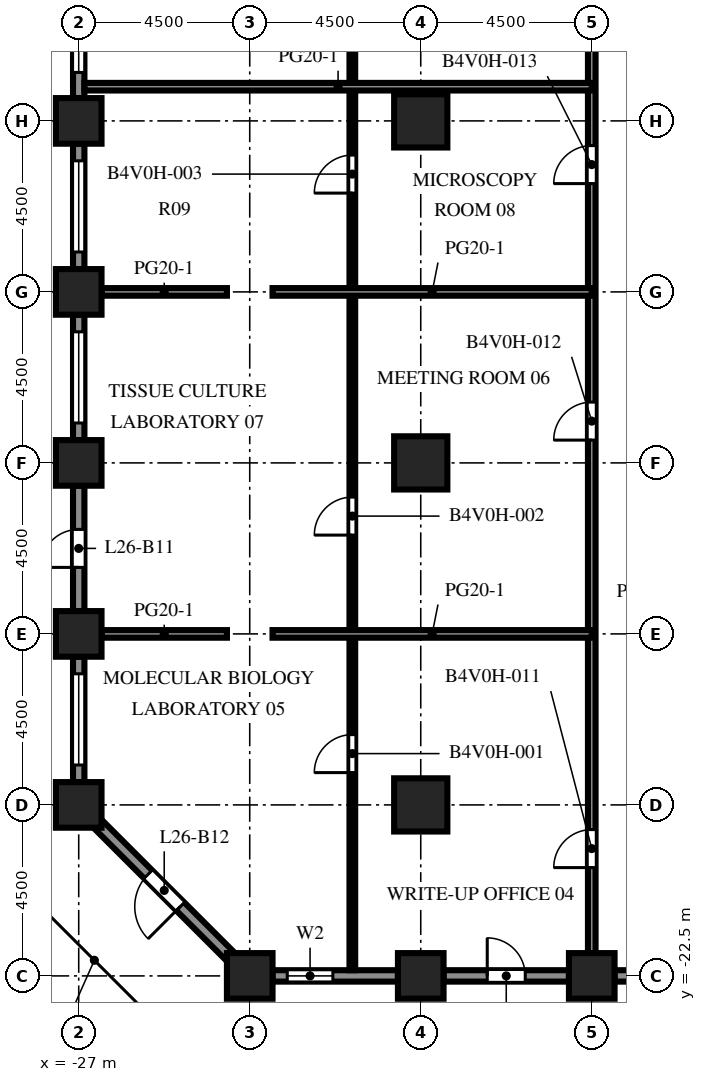
"""IFC4 building model, lengths in metres.
Left out: names, types, materials, properties, quantities, classifications, styles, units other than length and angle.
Written with IfcOpenShell. Run it as: python <this file> out.ifc"""

import sys

from ifc_helpers import new_model, si_unit, direction, frame, frame_2d, origin, origin_2d, place, context, subcontext, project, spatial, rectangle, extrude, element, fill, save


model = new_model("IFC4")
c1 = context("Model", 3, precision=1e-05, world=origin(), true_north=direction((0.0, 1.0)))
c2 = subcontext(c1, "Body", "Model", "MODEL_VIEW")
j1 = project(units=[si_unit("LENGTHUNIT", "METRE"), si_unit("PLANEANGLEUNIT", "RADIAN")], contexts=[c1])
p1 = place(None, origin())
s1 = spatial("IfcSite", under=j1, at=p1, CompositionType="ELEMENT")
p2 = place(p1, origin())
s2 = spatial("IfcBuilding", under=s1, at=p2, CompositionType="ELEMENT")
p3 = place(p2, frame((0.0, 0.0, 116.7)))
s3 = spatial("IfcBuildingStorey", under=s2, at=p3, CompositionType="ELEMENT", Elevation=116.7)
for number, where, z_axis, x_axis in (
    (1, (-27.0, -18.0, -0.45), (0.0, 0.0, 1.0), (1.0, 0.0, 0.0)),
    (2, (-27.0, -13.5, -0.45), (0.0, 0.0, 1.0), (1.0, 0.0, 0.0)),
    (3, (-27.0, -9.0, -0.45), (0.0, 0.0, 1.0), (1.0, 0.0, 0.0)),
    (4, (-27.0, -4.5, -0.45), (0.0, 0.0, 1.0), (1.0, 0.0, 0.0)),
    (5, (-27.0, 0.0, -0.45), (0.0, 0.0, 1.0), (1.0, 0.0, 0.0)),
):
    element("IfcColumn", number, at=place(p3, frame(where, z_axis=z_axis, x_axis=x_axis)), inside=s3, PredefinedType="COLUMN", context=c2, shape_type="SweptSolid", body=[
        extrude(rectangle(XDim=1.2, YDim=1.2, at=origin_2d()), origin(), (0.0, 0.0, 1.0), 4.55),
    ])
for number, where, z_axis, x_axis in (
    (6, (-22.5, -22.5, 0.0), (0.0, 0.0, 1.0), (1.0, 0.0, 0.0)),
    (7, (-18.0, -22.5, 0.0), (0.0, 0.0, 1.0), (1.0, 0.0, 0.0)),
    (8, (-13.5, -22.5, 0.0), (0.0, 0.0, 1.0), (1.0, 0.0, 0.0)),
):
    element("IfcColumn", number, at=place(p3, frame(where, z_axis=z_axis, x_axis=x_axis)), inside=s3, PredefinedType="COLUMN", context=c2, shape_type="SweptSolid", body=[
        extrude(rectangle(XDim=1.2, YDim=1.2, at=origin_2d()), origin(), (0.0, 0.0, 1.0), 4.1),
    ])
for number, where, z_axis, x_axis in (
    (9, (-18.0, -18.0, -0.45), (0.0, 0.0, 1.0), (1.0, 0.0, 0.0)),
    (10, (-18.0, -9.0, -0.45), (0.0, 0.0, 1.0), (1.0, 0.0, 0.0)),
    (11, (-18.0, 0.0, -0.45), (0.0, 0.0, 1.0), (1.0, 0.0, 0.0)),
):
    element("IfcColumn", number, at=place(p3, frame(where, z_axis=z_axis, x_axis=x_axis)), inside=s3, PredefinedType="COLUMN", context=c2, shape_type="SweptSolid", body=[
        extrude(rectangle(XDim=1.4, YDim=1.4, at=origin_2d()), origin(), (0.0, 0.0, 1.0), 4.55),
    ])
p4 = place(p3, frame((-18.6, -22.5, 0.0), z_axis=(0.0, 0.0, 1.0), x_axis=(-1.0, 0.0, 0.0)))
e12 = element("IfcWall", 12, at=p4, inside=s3, PredefinedType="SOLIDWALL", context=c2, shape_type="SweptSolid", body=[
    extrude(rectangle(XDim=3.3, YDim=0.3, at=frame_2d((1.65, 0.0))), origin(), (0.0, 0.0, 1.0), 2.75),
])
p5 = place(p4, frame((1.712, 0.0, 0.8)))
e13 = element("IfcOpeningElement", 13, at=p5, cuts=e12, PredefinedType="OPENING", context=c2, shape_type="SweptSolid", body=[
    extrude(rectangle(XDim=1.2, YDim=1.7, at=frame_2d((0.6, 0.85))), frame((0.0, 0.16, 0.0), z_axis=(0.0, -1.0, 0.0), x_axis=(1.0, 0.0, 0.0)), (0.0, 0.0, 1.0), 0.32),
])
p6 = place(p3, frame((-14.1, -22.5, 0.0), z_axis=(0.0, 0.0, 1.0), x_axis=(-1.0, 0.0, 0.0)))
e14 = element("IfcWall", 14, at=p6, inside=s3, PredefinedType="SOLIDWALL", context=c2, shape_type="SweptSolid", body=[
    extrude(rectangle(XDim=3.3, YDim=0.3, at=frame_2d((1.65, 0.0))), origin(), (0.0, 0.0, 1.0), 2.75),
])
p7 = place(p6, frame((1.15, 0.0, 0.0)))
e15 = element("IfcOpeningElement", 15, at=p7, cuts=e14, PredefinedType="OPENING", context=c2, shape_type="SweptSolid", body=[
    extrude(rectangle(XDim=1.0, YDim=2.2, at=frame_2d((0.5, 1.1))), frame((0.0, 0.16, 0.0), z_axis=(0.0, -1.0, 0.0), x_axis=(1.0, 0.0, 0.0)), (0.0, 0.0, 1.0), 0.32),
])
p8 = place(p3, frame((-9.6, -22.5, 0.0), z_axis=(0.0, 0.0, 1.0), x_axis=(-1.0, 0.0, 0.0)))
e16 = element("IfcWall", 16, at=p8, inside=s3, PredefinedType="SOLIDWALL", context=c2, shape_type="SweptSolid", body=[
    extrude(rectangle(XDim=3.3, YDim=0.3, at=frame_2d((1.65, 0.0))), origin(), (0.0, 0.0, 1.0), 2.75),
])
p9 = place(p8, frame((1.575, 0.0, 0.8)))
e17 = element("IfcOpeningElement", 17, at=p9, cuts=e16, PredefinedType="OPENING", context=c2, shape_type="SweptSolid", body=[
    extrude(rectangle(XDim=1.2, YDim=1.7, at=frame_2d((0.6, 0.85))), frame((0.0, 0.16, 0.0), z_axis=(0.0, -1.0, 0.0), x_axis=(1.0, 0.0, 0.0)), (0.0, 0.0, 1.0), 0.32),
])
p10 = place(p3, frame((-27.0, 0.6, 0.0), z_axis=(0.0, 0.0, 1.0), x_axis=(0.0, 1.0, 0.0)))
e18 = element("IfcWall", 18, at=p10, inside=s3, PredefinedType="SOLIDWALL", context=c2, shape_type="SweptSolid", body=[
    extrude(rectangle(XDim=3.3, YDim=0.3, at=frame_2d((1.65, 0.0))), origin(), (0.0, 0.0, 1.0), 2.75),
])
p11 = place(p10, frame((0.675, 0.0, 0.8)))
e19 = element("IfcOpeningElement", 19, at=p11, cuts=e18, PredefinedType="OPENING", context=c2, shape_type="SweptSolid", body=[
    extrude(rectangle(XDim=2.4, YDim=1.7, at=frame_2d((1.2, 0.85))), frame((0.0, 0.16, 0.0), z_axis=(0.0, -1.0, 0.0), x_axis=(1.0, 0.0, 0.0)), (0.0, 0.0, 1.0), 0.32),
])
p12 = place(p3, frame((-27.0, -3.9, 0.0), z_axis=(0.0, 0.0, 1.0), x_axis=(0.0, 1.0, 0.0)))
e20 = element("IfcWall", 20, at=p12, inside=s3, PredefinedType="SOLIDWALL", context=c2, shape_type="SweptSolid", body=[
    extrude(rectangle(XDim=3.3, YDim=0.3, at=frame_2d((1.65, 0.0))), origin(), (0.0, 0.0, 1.0), 2.75),
])
p13 = place(p12, frame((0.45, 0.0, 0.8)))
e21 = element("IfcOpeningElement", 21, at=p13, cuts=e20, PredefinedType="OPENING", context=c2, shape_type="SweptSolid", body=[
    extrude(rectangle(XDim=2.4, YDim=1.7, at=frame_2d((1.2, 0.85))), frame((0.0, 0.16, 0.0), z_axis=(0.0, -1.0, 0.0), x_axis=(1.0, 0.0, 0.0)), (0.0, 0.0, 1.0), 0.32),
])
p14 = place(p3, frame((-27.0, -8.4, 0.0), z_axis=(0.0, 0.0, 1.0), x_axis=(0.0, 1.0, 0.0)))
e22 = element("IfcWall", 22, at=p14, inside=s3, PredefinedType="SOLIDWALL", context=c2, shape_type="SweptSolid", body=[
    extrude(rectangle(XDim=3.3, YDim=0.3, at=frame_2d((1.65, 0.0))), origin(), (0.0, 0.0, 1.0), 2.75),
])
p15 = place(p14, frame((0.45, 0.0, 0.8)))
e23 = element("IfcOpeningElement", 23, at=p15, cuts=e22, PredefinedType="OPENING", context=c2, shape_type="SweptSolid", body=[
    extrude(rectangle(XDim=2.4, YDim=1.7, at=frame_2d((1.2, 0.85))), frame((0.0, 0.16, 0.0), z_axis=(0.0, -1.0, 0.0), x_axis=(1.0, 0.0, 0.0)), (0.0, 0.0, 1.0), 0.32),
])
p16 = place(p3, frame((-27.0, -12.9, 0.0), z_axis=(0.0, 0.0, 1.0), x_axis=(0.0, 1.0, 0.0)))
e24 = element("IfcWall", 24, at=p16, inside=s3, PredefinedType="SOLIDWALL", context=c2, shape_type="SweptSolid", body=[
    extrude(rectangle(XDim=3.3, YDim=0.3, at=frame_2d((1.65, 0.0))), origin(), (0.0, 0.0, 1.0), 2.75),
])
p17 = place(p16, frame((1.15, 0.0, 0.0)))
e25 = element("IfcOpeningElement", 25, at=p17, cuts=e24, PredefinedType="OPENING", context=c2, shape_type="SweptSolid", body=[
    extrude(rectangle(XDim=1.0, YDim=2.2, at=frame_2d((0.5, 1.1))), frame((0.0, 0.16, 0.0), z_axis=(0.0, -1.0, 0.0), x_axis=(1.0, 0.0, 0.0)), (0.0, 0.0, 1.0), 0.32),
])
p18 = place(p3, frame((-27.0, -17.4, 0.0), z_axis=(0.0, 0.0, 1.0), x_axis=(0.0, 1.0, 0.0)))
e26 = element("IfcWall", 26, at=p18, inside=s3, PredefinedType="SOLIDWALL", context=c2, shape_type="SweptSolid", body=[
    extrude(rectangle(XDim=3.3, YDim=0.3, at=frame_2d((1.65, 0.0))), origin(), (0.0, 0.0, 1.0), 2.75),
])
p19 = place(p18, frame((0.45, 0.0, 0.8)))
e27 = element("IfcOpeningElement", 27, at=p19, cuts=e26, PredefinedType="OPENING", context=c2, shape_type="SweptSolid", body=[
    extrude(rectangle(XDim=2.4, YDim=1.7, at=frame_2d((1.2, 0.85))), frame((0.0, 0.16, 0.0), z_axis=(0.0, -1.0, 0.0), x_axis=(1.0, 0.0, 0.0)), (0.0, 0.0, 1.0), 0.32),
])
p20 = place(p3, frame((-22.994, -22.006, 0.0), z_axis=(0.0, 0.0, 1.0), x_axis=(-0.707106781187, 0.707106781187, 0.0)))
e28 = element("IfcWall", 28, at=p20, inside=s3, PredefinedType="SOLIDWALL", context=c2, shape_type="SweptSolid", body=[
    extrude(rectangle(XDim=4.967, YDim=0.3, at=frame_2d((2.483, 0.0))), origin(), (0.0, 0.0, 1.0), 2.75),
])
p21 = place(p20, frame((1.884, 0.0, 0.0)))
e29 = element("IfcOpeningElement", 29, at=p21, cuts=e28, PredefinedType="OPENING", context=c2, shape_type="SweptSolid", body=[
    extrude(rectangle(XDim=1.2, YDim=2.2, at=frame_2d((0.6, 1.1))), frame((0.0, 0.16, 0.0), z_axis=(0.0, -1.0, 0.0), x_axis=(1.0, 0.0, 0.0)), (0.0, 0.0, 1.0), 0.32),
])
p22 = place(p3, frame((-19.8, -22.35, 0.0), z_axis=(0.0, 0.0, 1.0), x_axis=(0.0, 1.0, 0.0)))
e30 = element("IfcWall", 30, at=p22, inside=s3, PredefinedType="PARTITIONING", context=c2, shape_type="SweptSolid", body=[
    extrude(rectangle(XDim=53.7, YDim=0.15, at=frame_2d((26.85, 0.0))), origin(), (0.0, 0.0, 1.0), 3.65),
])
p23 = place(p22, frame((5.2, 0.0, 0.0)))
e31 = element("IfcOpeningElement", 31, at=p23, cuts=e30, PredefinedType="OPENING", context=c2, shape_type="SweptSolid", body=[
    extrude(rectangle(XDim=1.0, YDim=2.1, at=frame_2d((0.5, 1.05))), frame((0.0, 0.085, 0.0), z_axis=(0.0, -1.0, 0.0), x_axis=(1.0, 0.0, 0.0)), (0.0, 0.0, 1.0), 0.17),
])
p24 = place(p22, frame((11.45, 0.0, 0.0)))
e32 = element("IfcOpeningElement", 32, at=p24, cuts=e30, PredefinedType="OPENING", context=c2, shape_type="SweptSolid", body=[
    extrude(rectangle(XDim=1.0, YDim=2.1, at=frame_2d((0.5, 1.05))), frame((0.0, 0.085, 0.0), z_axis=(0.0, -1.0, 0.0), x_axis=(1.0, 0.0, 0.0)), (0.0, 0.0, 1.0), 0.17),
])
p25 = place(p22, frame((20.45, 0.0, 0.0)))
e33 = element("IfcOpeningElement", 33, at=p25, cuts=e30, PredefinedType="OPENING", context=c2, shape_type="SweptSolid", body=[
    extrude(rectangle(XDim=1.0, YDim=2.1, at=frame_2d((0.5, 1.05))), frame((0.0, 0.085, 0.0), z_axis=(0.0, -1.0, 0.0), x_axis=(1.0, 0.0, 0.0)), (0.0, 0.0, 1.0), 0.17),
])
p26 = place(p22, frame((27.85, 0.0, 0.0)))
e34 = element("IfcOpeningElement", 34, at=p26, cuts=e30, PredefinedType="OPENING", context=c2, shape_type="SweptSolid", body=[
    extrude(rectangle(XDim=1.0, YDim=2.1, at=frame_2d((0.5, 1.05))), frame((0.0, 0.085, 0.0), z_axis=(0.0, -1.0, 0.0), x_axis=(1.0, 0.0, 0.0)), (0.0, 0.0, 1.0), 0.17),
])
p27 = place(p22, frame((41.2, 0.0, 0.0)))
e35 = element("IfcOpeningElement", 35, at=p27, cuts=e30, PredefinedType="OPENING", context=c2, shape_type="SweptSolid", body=[
    extrude(rectangle(XDim=1.0, YDim=2.1, at=frame_2d((0.5, 1.05))), frame((0.0, 0.085, 0.0), z_axis=(0.0, -1.0, 0.0), x_axis=(1.0, 0.0, 0.0)), (0.0, 0.0, 1.0), 0.17),
])
p28 = place(p22, frame((50.2, 0.0, 0.0)))
e36 = element("IfcOpeningElement", 36, at=p28, cuts=e30, PredefinedType="OPENING", context=c2, shape_type="SweptSolid", body=[
    extrude(rectangle(XDim=1.0, YDim=2.1, at=frame_2d((0.5, 1.05))), frame((0.0, 0.085, 0.0), z_axis=(0.0, -1.0, 0.0), x_axis=(1.0, 0.0, 0.0)), (0.0, 0.0, 1.0), 0.17),
])
p29 = place(p3, frame((-13.5, -21.9, 0.0), z_axis=(0.0, 0.0, 1.0), x_axis=(0.0, 1.0, 0.0)))
e37 = element("IfcWall", 37, at=p29, inside=s3, PredefinedType="PARTITIONING", context=c2, shape_type="SweptSolid", body=[
    extrude(rectangle(XDim=52.8, YDim=0.2, at=frame_2d((26.4, 0.0))), origin(), (0.0, 0.0, 1.0), 3.65),
])
p30 = place(p29, frame((2.25, 0.0, 0.0)))
e38 = element("IfcOpeningElement", 38, at=p30, cuts=e37, PredefinedType="OPENING", context=c2, shape_type="SweptSolid", body=[
    extrude(rectangle(XDim=1.0, YDim=2.1, at=frame_2d((0.5, 1.05))), frame((0.0, 0.11, 0.0), z_axis=(0.0, -1.0, 0.0), x_axis=(1.0, 0.0, 0.0)), (0.0, 0.0, 1.0), 0.22),
])
p31 = place(p29, frame((13.5, 0.0, 0.0)))
e39 = element("IfcOpeningElement", 39, at=p31, cuts=e37, PredefinedType="OPENING", context=c2, shape_type="SweptSolid", body=[
    extrude(rectangle(XDim=1.0, YDim=2.1, at=frame_2d((0.5, 1.05))), frame((0.0, 0.11, 0.0), z_axis=(0.0, -1.0, 0.0), x_axis=(1.0, 0.0, 0.0)), (0.0, 0.0, 1.0), 0.22),
])
p32 = place(p29, frame((20.25, 0.0, 0.0)))
e40 = element("IfcOpeningElement", 40, at=p32, cuts=e37, PredefinedType="OPENING", context=c2, shape_type="SweptSolid", body=[
    extrude(rectangle(XDim=1.0, YDim=2.1, at=frame_2d((0.5, 1.05))), frame((0.0, 0.11, 0.0), z_axis=(0.0, -1.0, 0.0), x_axis=(1.0, 0.0, 0.0)), (0.0, 0.0, 1.0), 0.22),
])
p33 = place(p29, frame((28.4, 0.0, 0.0)))
e41 = element("IfcOpeningElement", 41, at=p33, cuts=e37, PredefinedType="OPENING", context=c2, shape_type="SweptSolid", body=[
    extrude(rectangle(XDim=1.0, YDim=2.1, at=frame_2d((0.5, 1.05))), frame((0.0, 0.11, 0.0), z_axis=(0.0, -1.0, 0.0), x_axis=(1.0, 0.0, 0.0)), (0.0, 0.0, 1.0), 0.22),
])
p34 = place(p29, frame((40.5, 0.0, 0.0)))
e42 = element("IfcOpeningElement", 42, at=p34, cuts=e37, PredefinedType="OPENING", context=c2, shape_type="SweptSolid", body=[
    extrude(rectangle(XDim=1.0, YDim=2.1, at=frame_2d((0.5, 1.05))), frame((0.0, 0.11, 0.0), z_axis=(0.0, -1.0, 0.0), x_axis=(1.0, 0.0, 0.0)), (0.0, 0.0, 1.0), 0.22),
])
p35 = place(p29, frame((49.5, 0.0, 0.0)))
e43 = element("IfcOpeningElement", 43, at=p35, cuts=e37, PredefinedType="OPENING", context=c2, shape_type="SweptSolid", body=[
    extrude(rectangle(XDim=1.0, YDim=2.1, at=frame_2d((0.5, 1.05))), frame((0.0, 0.11, 0.0), z_axis=(0.0, -1.0, 0.0), x_axis=(1.0, 0.0, 0.0)), (0.0, 0.0, 1.0), 0.22),
])
p36 = place(p3, frame((-26.4, -13.5, 0.0), z_axis=(0.0, 0.0, 1.0), x_axis=(1.0, 0.0, 0.0)))
e44 = element("IfcWall", 44, at=p36, inside=s3, PredefinedType="PARTITIONING", context=c2, shape_type="SweptSolid", body=[
    extrude(rectangle(XDim=3.3, YDim=0.2, at=frame_2d((1.65, 0.0))), origin(), (0.0, 0.0, 1.0), 3.65),
])
p37 = place(p3, frame((-21.9, -13.5, 0.0), z_axis=(0.0, 0.0, 1.0), x_axis=(1.0, 0.0, 0.0)))
e45 = element("IfcWall", 45, at=p37, inside=s3, PredefinedType="PARTITIONING", context=c2, shape_type="SweptSolid", body=[
    extrude(rectangle(XDim=8.4, YDim=0.2, at=frame_2d((4.2, 0.0))), origin(), (0.0, 0.0, 1.0), 3.65),
])
p38 = place(p3, frame((-26.4, -4.5, 0.0), z_axis=(0.0, 0.0, 1.0), x_axis=(1.0, 0.0, 0.0)))
e46 = element("IfcWall", 46, at=p38, inside=s3, PredefinedType="PARTITIONING", context=c2, shape_type="SweptSolid", body=[
    extrude(rectangle(XDim=3.3, YDim=0.2, at=frame_2d((1.65, 0.0))), origin(), (0.0, 0.0, 1.0), 3.65),
])
p39 = place(p3, frame((-21.9, -4.5, 0.0), z_axis=(0.0, 0.0, 1.0), x_axis=(1.0, 0.0, 0.0)))
e47 = element("IfcWall", 47, at=p39, inside=s3, PredefinedType="PARTITIONING", context=c2, shape_type="SweptSolid", body=[
    extrude(rectangle(XDim=8.4, YDim=0.2, at=frame_2d((4.2, 0.0))), origin(), (0.0, 0.0, 1.0), 3.65),
])
p40 = place(p3, frame((-26.85, 0.9, 0.0), z_axis=(0.0, 0.0, 1.0), x_axis=(1.0, 0.0, 0.0)))
e48 = element("IfcWall", 48, at=p40, inside=s3, PredefinedType="PARTITIONING", context=c2, shape_type="SweptSolid", body=[
    extrude(rectangle(XDim=13.35, YDim=0.2, at=frame_2d((6.675, 0.0))), origin(), (0.0, 0.0, 1.0), 3.65),
])
p41 = place(p5, origin())
e49 = element("IfcWindow", 49, at=p41, inside=s3, PartitioningType="SINGLE_PANEL", PredefinedType="WINDOW", context=c2, shape_type="SweptSolid", body=[
    extrude(rectangle(XDim=1.2, YDim=1.7, at=frame_2d((0.6, 0.85))), frame((0.0, 0.03, 0.0), z_axis=(0.0, -1.0, 0.0), x_axis=(1.0, 0.0, 0.0)), (0.0, 0.0, 1.0), 0.06),
])
fill(e13, e49)
p42 = place(p7, origin())
e50 = element("IfcDoor", 50, at=p42, inside=s3, OperationType="SINGLE_SWING_RIGHT", PredefinedType="DOOR", context=c2, shape_type="SweptSolid", body=[
    extrude(rectangle(XDim=1.0, YDim=2.2, at=frame_2d((0.5, 1.1))), frame((0.0, 0.025, 0.0), z_axis=(0.0, -1.0, 0.0), x_axis=(1.0, 0.0, 0.0)), (0.0, 0.0, 1.0), 0.05),
])
fill(e15, e50)
p43 = place(p11, origin())
e51 = element("IfcWindow", 51, at=p43, inside=s3, PartitioningType="SINGLE_PANEL", PredefinedType="WINDOW", context=c2, shape_type="SweptSolid", body=[
    extrude(rectangle(XDim=2.4, YDim=1.7, at=frame_2d((1.2, 0.85))), frame((0.0, 0.03, 0.0), z_axis=(0.0, -1.0, 0.0), x_axis=(1.0, 0.0, 0.0)), (0.0, 0.0, 1.0), 0.06),
])
fill(e19, e51)
p44 = place(p13, origin())
e52 = element("IfcWindow", 52, at=p44, inside=s3, PartitioningType="SINGLE_PANEL", PredefinedType="WINDOW", context=c2, shape_type="SweptSolid", body=[
    extrude(rectangle(XDim=2.4, YDim=1.7, at=frame_2d((1.2, 0.85))), frame((0.0, 0.03, 0.0), z_axis=(0.0, -1.0, 0.0), x_axis=(1.0, 0.0, 0.0)), (0.0, 0.0, 1.0), 0.06),
])
fill(e21, e52)
p45 = place(p15, origin())
e53 = element("IfcWindow", 53, at=p45, inside=s3, PartitioningType="SINGLE_PANEL", PredefinedType="WINDOW", context=c2, shape_type="SweptSolid", body=[
    extrude(rectangle(XDim=2.4, YDim=1.7, at=frame_2d((1.2, 0.85))), frame((0.0, 0.03, 0.0), z_axis=(0.0, -1.0, 0.0), x_axis=(1.0, 0.0, 0.0)), (0.0, 0.0, 1.0), 0.06),
])
fill(e23, e53)
p46 = place(p17, origin())
e54 = element("IfcDoor", 54, at=p46, inside=s3, OperationType="SINGLE_SWING_LEFT", PredefinedType="DOOR", context=c2, shape_type="SweptSolid", body=[
    extrude(rectangle(XDim=1.0, YDim=2.2, at=frame_2d((0.5, 1.1))), frame((0.0, 0.025, 0.0), z_axis=(0.0, -1.0, 0.0), x_axis=(1.0, 0.0, 0.0)), (0.0, 0.0, 1.0), 0.05),
])
fill(e25, e54)
p47 = place(p19, origin())
e55 = element("IfcWindow", 55, at=p47, inside=s3, PartitioningType="SINGLE_PANEL", PredefinedType="WINDOW", context=c2, shape_type="SweptSolid", body=[
    extrude(rectangle(XDim=2.4, YDim=1.7, at=frame_2d((1.2, 0.85))), frame((0.0, 0.03, 0.0), z_axis=(0.0, -1.0, 0.0), x_axis=(1.0, 0.0, 0.0)), (0.0, 0.0, 1.0), 0.06),
])
fill(e27, e55)
p48 = place(p21, origin())
e56 = element("IfcDoor", 56, at=p48, inside=s3, OperationType="SINGLE_SWING_LEFT", PredefinedType="DOOR", context=c2, shape_type="SweptSolid", body=[
    extrude(rectangle(XDim=1.2, YDim=2.2, at=frame_2d((0.6, 1.1))), frame((0.0, 0.025, 0.0), z_axis=(0.0, -1.0, 0.0), x_axis=(1.0, 0.0, 0.0)), (0.0, 0.0, 1.0), 0.05),
])
fill(e29, e56)
p49 = place(p23, origin())
e57 = element("IfcDoor", 57, at=p49, inside=s3, OperationType="SINGLE_SWING_LEFT", PredefinedType="DOOR", context=c2, shape_type="SweptSolid", body=[
    extrude(rectangle(XDim=1.0, YDim=2.1, at=frame_2d((0.5, 1.05))), frame((0.0, 0.025, 0.0), z_axis=(0.0, -1.0, 0.0), x_axis=(1.0, 0.0, 0.0)), (0.0, 0.0, 1.0), 0.05),
])
fill(e31, e57)
p50 = place(p24, origin())
e58 = element("IfcDoor", 58, at=p50, inside=s3, OperationType="SINGLE_SWING_LEFT", PredefinedType="DOOR", context=c2, shape_type="SweptSolid", body=[
    extrude(rectangle(XDim=1.0, YDim=2.1, at=frame_2d((0.5, 1.05))), frame((0.0, 0.025, 0.0), z_axis=(0.0, -1.0, 0.0), x_axis=(1.0, 0.0, 0.0)), (0.0, 0.0, 1.0), 0.05),
])
fill(e32, e58)
p51 = place(p25, origin())
e59 = element("IfcDoor", 59, at=p51, inside=s3, OperationType="SINGLE_SWING_LEFT", PredefinedType="DOOR", context=c2, shape_type="SweptSolid", body=[
    extrude(rectangle(XDim=1.0, YDim=2.1, at=frame_2d((0.5, 1.05))), frame((0.0, 0.025, 0.0), z_axis=(0.0, -1.0, 0.0), x_axis=(1.0, 0.0, 0.0)), (0.0, 0.0, 1.0), 0.05),
])
fill(e33, e59)
p52 = place(p30, origin())
e60 = element("IfcDoor", 60, at=p52, inside=s3, OperationType="SINGLE_SWING_LEFT", PredefinedType="DOOR", context=c2, shape_type="SweptSolid", body=[
    extrude(rectangle(XDim=1.0, YDim=2.1, at=frame_2d((0.5, 1.05))), frame((0.0, 0.025, 0.0), z_axis=(0.0, -1.0, 0.0), x_axis=(1.0, 0.0, 0.0)), (0.0, 0.0, 1.0), 0.05),
])
fill(e38, e60)
p53 = place(p31, origin())
e61 = element("IfcDoor", 61, at=p53, inside=s3, OperationType="SINGLE_SWING_LEFT", PredefinedType="DOOR", context=c2, shape_type="SweptSolid", body=[
    extrude(rectangle(XDim=1.0, YDim=2.1, at=frame_2d((0.5, 1.05))), frame((0.0, 0.025, 0.0), z_axis=(0.0, -1.0, 0.0), x_axis=(1.0, 0.0, 0.0)), (0.0, 0.0, 1.0), 0.05),
])
fill(e39, e61)
p54 = place(p32, origin())
e62 = element("IfcDoor", 62, at=p54, inside=s3, OperationType="SINGLE_SWING_LEFT", PredefinedType="DOOR", context=c2, shape_type="SweptSolid", body=[
    extrude(rectangle(XDim=1.0, YDim=2.1, at=frame_2d((0.5, 1.05))), frame((0.0, 0.025, 0.0), z_axis=(0.0, -1.0, 0.0), x_axis=(1.0, 0.0, 0.0)), (0.0, 0.0, 1.0), 0.05),
])
fill(e40, e62)
save(model, sys.argv[1])
